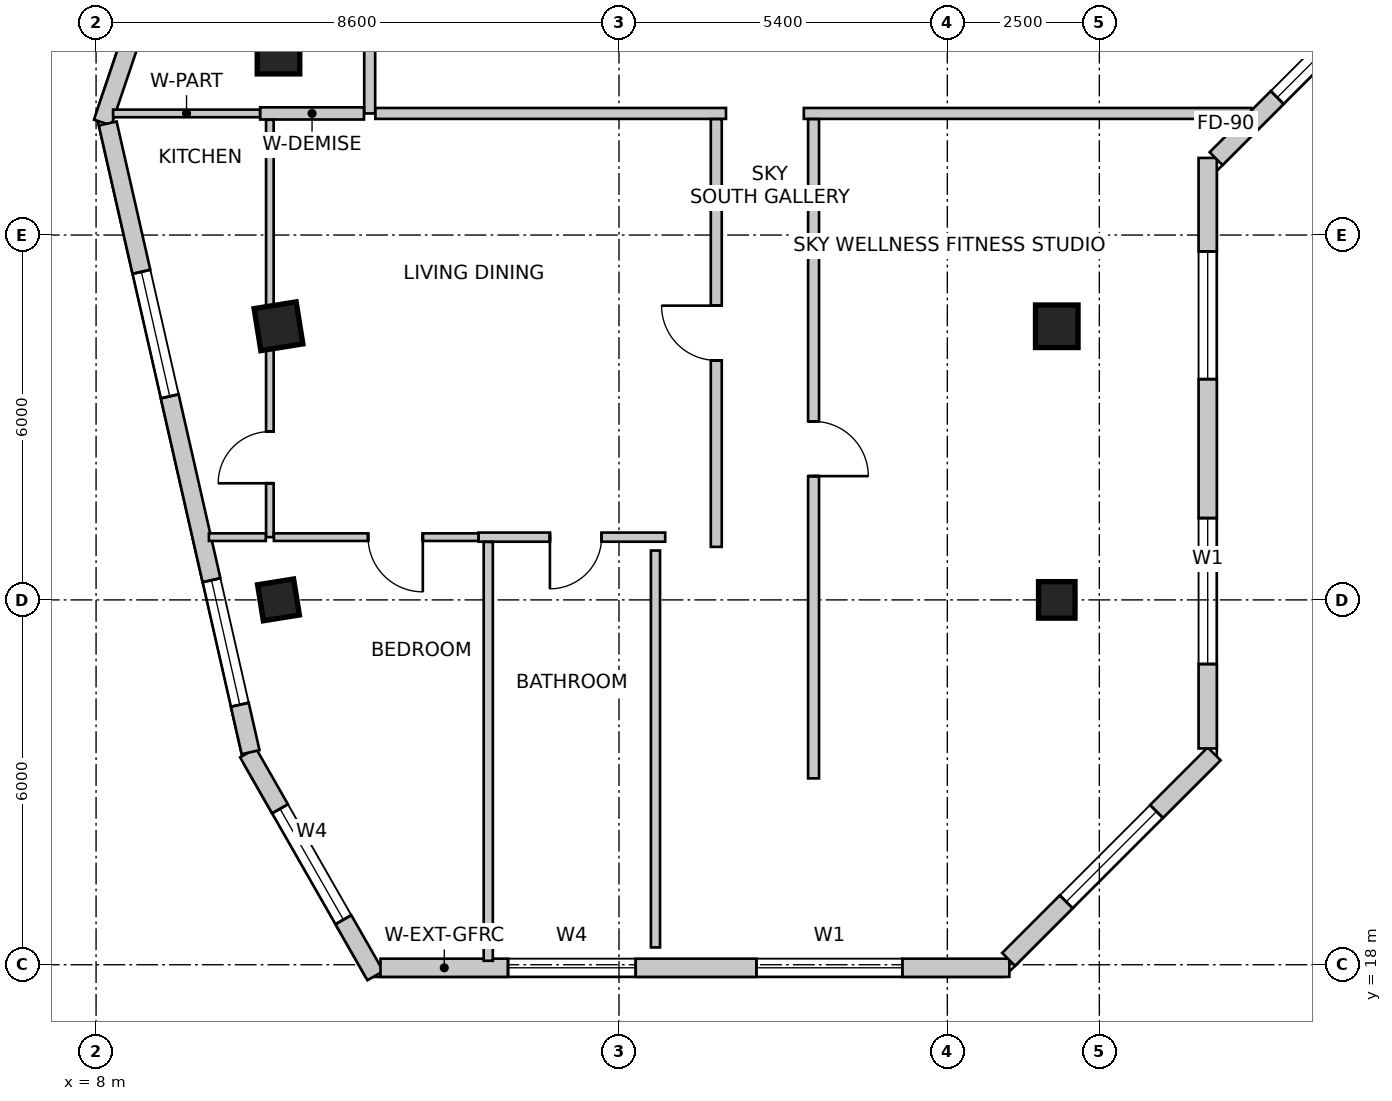
"""IFC4 building model, lengths in metres.
Left out: names, types, materials, properties, quantities, classifications, styles, units other than length and angle.
Written with IfcOpenShell. Run it as: python <this file> out.ifc"""

import sys

from ifc_helpers import new_model, si_unit, direction, frame, frame_2d, origin, origin_2d, place, context, subcontext, project, spatial, rectangle, extrude, source, transform, mapped, element, fill, save


model = new_model("IFC4")
c1 = context("Model", 3, precision=1e-05, world=origin(), true_north=direction((0.0, 1.0)))
c2 = subcontext(c1, "Body", "Model", "MODEL_VIEW")
j1 = project(units=[si_unit("LENGTHUNIT", "METRE"), si_unit("PLANEANGLEUNIT", "RADIAN")], contexts=[c1])
p1 = place(None, origin())
s1 = spatial("IfcSite", under=j1, at=p1, CompositionType="ELEMENT")
p2 = place(p1, origin())
s2 = spatial("IfcBuilding", under=s1, at=p2, CompositionType="ELEMENT")
p3 = place(p2, frame((0.0, 0.0, 267.3)))
s3 = spatial("IfcBuildingStorey", under=s2, at=p3, CompositionType="ELEMENT", Elevation=267.3)
m1 = source(origin(), c2, "Body", "SweptSolid", [
    extrude(rectangle(XDim=0.7, YDim=0.7, at=origin_2d()), origin(), (0.0, 0.0, 1.0), 3.6),
])
for number, where, z_axis, x_axis in (
    (1, (11.0, 33.0, 0.0), (0.0, 0.0, 1.0), (1.0, 0.0, 0.0)),
    (2, (11.0, 28.5, 0.0), (0.0, 0.0, 1.0), (0.158, -0.987, 0.0)),
):
    element("IfcColumn", number, at=place(p3, frame(where, z_axis=z_axis, x_axis=x_axis)), inside=s3, PredefinedType="COLUMN", context=c2, shape_type="MappedRepresentation", body=[
        mapped(m1, transform((0.0, 0.0, 0.0), scale=1.0)),
    ])
m2 = source(origin(), c2, "Body", "SweptSolid", [
    extrude(rectangle(XDim=0.6, YDim=0.6, at=origin_2d()), origin(), (0.0, 0.0, 1.0), 3.6),
])
p4 = place(p3, frame((11.0, 24.0, 0.0), z_axis=(0.0, 0.0, 1.0), x_axis=(0.158158067254, -0.987413806751, 0.0)))
e3 = element("IfcColumn", 3, at=p4, inside=s3, PredefinedType="COLUMN", context=c2, shape_type="MappedRepresentation", body=[
    mapped(m2, transform((0.0, 0.0, 0.0), scale=1.0)),
])
p5 = place(p3, frame((23.8, 28.5, 0.0), z_axis=(0.0, 0.0, 1.0), x_axis=(1.0, 0.0, 0.0)))
e4 = element("IfcColumn", 4, at=p5, inside=s3, PredefinedType="COLUMN", context=c2, shape_type="MappedRepresentation", body=[
    mapped(m1, transform((0.0, 0.0, 0.0), scale=1.0)),
])
p6 = place(p3, frame((23.8, 24.0, 0.0), z_axis=(0.0, 0.0, 1.0), x_axis=(1.0, 0.0, 0.0)))
e5 = element("IfcColumn", 5, at=p6, inside=s3, PredefinedType="COLUMN", context=c2, shape_type="MappedRepresentation", body=[
    mapped(m2, transform((0.0, 0.0, 0.0), scale=1.0)),
])
p7 = place(p3, frame((10.499, 21.485, 0.0), z_axis=(0.0, 0.0, 1.0), x_axis=(0.496163848656, -0.868228907194, 0.0)))
e6 = element("IfcWall", 6, at=p7, inside=s3, PredefinedType="SOLIDWALL", context=c2, shape_type="SweptSolid", body=[
    extrude(rectangle(XDim=4.222, YDim=0.3, at=frame_2d((2.111, 0.0))), origin(), (0.0, 0.0, 1.0), 3.35),
])
m3 = source(origin(), c2, "Body", "SweptSolid", [
    extrude(rectangle(XDim=2.1, YDim=2.0, at=frame_2d((1.05, 1.0))), frame((0.0, 0.16, 0.0), z_axis=(0.0, -1.0, 0.0), x_axis=(1.0, 0.0, 0.0)), (0.0, 0.0, 1.0), 0.32),
])
p8 = place(p7, frame((1.061, 0.0, 0.85)))
e7 = element("IfcOpeningElement", 7, at=p8, cuts=e6, PredefinedType="OPENING", context=c2, shape_type="MappedRepresentation", body=[
    mapped(m3, transform((0.0, 0.0, 0.0), scale=1.0)),
])
p9 = place(p3, frame((12.678, 17.95, 0.0), z_axis=(0.0, 0.0, 1.0), x_axis=(1.0, 0.0, 0.0)))
e8 = element("IfcWall", 8, at=p9, inside=s3, PredefinedType="SOLIDWALL", context=c2, shape_type="SweptSolid", body=[
    extrude(rectangle(XDim=10.342, YDim=0.3, at=frame_2d((5.171, 0.0))), origin(), (0.0, 0.0, 1.0), 3.35),
])
p10 = place(p9, frame((2.097, 0.0, 0.85)))
e9 = element("IfcOpeningElement", 9, at=p10, cuts=e8, PredefinedType="OPENING", context=c2, shape_type="MappedRepresentation", body=[
    mapped(m3, transform((0.0, 0.0, 0.0), scale=1.0)),
])
m4 = source(origin(), c2, "Body", "SweptSolid", [
    extrude(rectangle(XDim=2.4, YDim=2.2, at=frame_2d((1.2, 1.1))), frame((0.0, 0.16, 0.0), z_axis=(0.0, -1.0, 0.0), x_axis=(1.0, 0.0, 0.0)), (0.0, 0.0, 1.0), 0.32),
])
p11 = place(p9, frame((6.182, 0.0, 0.85)))
e10 = element("IfcOpeningElement", 10, at=p11, cuts=e8, PredefinedType="OPENING", context=c2, shape_type="MappedRepresentation", body=[
    mapped(m4, transform((0.0, 0.0, 0.0), scale=1.0)),
])
p12 = place(p3, frame((23.008, 18.088, 0.0), z_axis=(0.0, 0.0, 1.0), x_axis=(0.707106781187, 0.707106781187, 0.0)))
e11 = element("IfcWall", 11, at=p12, inside=s3, PredefinedType="SOLIDWALL", context=c2, shape_type="SweptSolid", body=[
    extrude(rectangle(XDim=4.781, YDim=0.3, at=frame_2d((2.39, 0.0))), origin(), (0.0, 0.0, 1.0), 3.35),
])
p13 = place(p12, frame((1.34, 0.0, 0.85)))
e12 = element("IfcOpeningElement", 12, at=p13, cuts=e11, PredefinedType="OPENING", context=c2, shape_type="MappedRepresentation", body=[
    mapped(m3, transform((0.0, 0.0, 0.0), scale=1.0)),
])
p14 = place(p3, frame((26.282, 21.557, 0.0), z_axis=(0.0, 0.0, 1.0), x_axis=(0.0, 1.0, 0.0)))
e13 = element("IfcWall", 13, at=p14, inside=s3, PredefinedType="SOLIDWALL", context=c2, shape_type="SweptSolid", body=[
    extrude(rectangle(XDim=9.711, YDim=0.3, at=frame_2d((4.855, 0.0))), origin(), (0.0, 0.0, 1.0), 3.35),
])
p15 = place(p14, frame((1.388, 0.0, 0.85)))
e14 = element("IfcOpeningElement", 14, at=p15, cuts=e13, PredefinedType="OPENING", context=c2, shape_type="MappedRepresentation", body=[
    mapped(m4, transform((0.0, 0.0, 0.0), scale=1.0)),
])
p16 = place(p14, frame((6.073, 0.0, 0.85)))
e15 = element("IfcOpeningElement", 15, at=p16, cuts=e13, PredefinedType="OPENING", context=c2, shape_type="MappedRepresentation", body=[
    mapped(m3, transform((0.0, 0.0, 0.0), scale=1.0)),
])
p17 = place(p3, frame((26.42, 31.256, 0.0), z_axis=(0.0, 0.0, 1.0), x_axis=(0.707106781187, 0.707106781187, 0.0)))
e16 = element("IfcWall", 16, at=p17, inside=s3, PredefinedType="SOLIDWALL", context=c2, shape_type="SweptSolid", body=[
    extrude(rectangle(XDim=2.907, YDim=0.3, at=frame_2d((1.454, 0.0))), origin(), (0.0, 0.0, 1.0), 3.35),
])
m5 = source(origin(), c2, "Body", "SweptSolid", [
    extrude(rectangle(XDim=0.9, YDim=1.6, at=frame_2d((0.45, 0.8))), frame((0.0, 0.16, 0.0), z_axis=(0.0, -1.0, 0.0), x_axis=(1.0, 0.0, 0.0)), (0.0, 0.0, 1.0), 0.32),
])
p18 = place(p17, frame((1.422, 0.0, 0.85)))
e17 = element("IfcOpeningElement", 17, at=p18, cuts=e16, PredefinedType="OPENING", context=c2, shape_type="MappedRepresentation", body=[
    mapped(m5, transform((0.0, 0.0, 0.0), scale=1.0)),
])
p19 = place(p3, frame((13.269, 47.134, 0.0), z_axis=(0.0, 0.0, 1.0), x_axis=(-0.3199211297, -0.947444178182, 0.0)))
e18 = element("IfcWall", 18, at=p19, inside=s3, PredefinedType="SOLIDWALL", context=c2, shape_type="SweptSolid", body=[
    extrude(rectangle(XDim=16.132, YDim=0.3, at=frame_2d((8.066, 0.0))), origin(), (0.0, 0.0, 1.0), 3.35),
])
p20 = place(p19, frame((2.435, 0.0, 0.85)))
e19 = element("IfcOpeningElement", 19, at=p20, cuts=e18, PredefinedType="OPENING", context=c2, shape_type="MappedRepresentation", body=[
    mapped(m4, transform((0.0, 0.0, 0.0), scale=1.0)),
])
p21 = place(p19, frame((7.417, 0.0, 0.85)))
e20 = element("IfcOpeningElement", 20, at=p21, cuts=e18, PredefinedType="OPENING", context=c2, shape_type="MappedRepresentation", body=[
    mapped(m3, transform((0.0, 0.0, 0.0), scale=1.0)),
])
p22 = place(p19, frame((12.099, 0.0, 0.85)))
e21 = element("IfcOpeningElement", 21, at=p22, cuts=e18, PredefinedType="OPENING", context=c2, shape_type="MappedRepresentation", body=[
    mapped(m4, transform((0.0, 0.0, 0.0), scale=1.0)),
])
p23 = place(p3, frame((8.191, 31.834, 0.0), z_axis=(0.0, 0.0, 1.0), x_axis=(0.221636032737, -0.975129462683, 0.0)))
e22 = element("IfcWall", 22, at=p23, inside=s3, PredefinedType="SOLIDWALL", context=c2, shape_type="SweptSolid", body=[
    extrude(rectangle(XDim=10.602, YDim=0.3, at=frame_2d((5.301, 0.0))), origin(), (0.0, 0.0, 1.0), 3.35),
])
p24 = place(p23, frame((2.501, 0.0, 0.85)))
e23 = element("IfcOpeningElement", 23, at=p24, cuts=e22, PredefinedType="OPENING", context=c2, shape_type="MappedRepresentation", body=[
    mapped(m3, transform((0.0, 0.0, 0.0), scale=1.0)),
])
p25 = place(p23, frame((7.702, 0.0, 0.85)))
e24 = element("IfcOpeningElement", 24, at=p25, cuts=e22, PredefinedType="OPENING", context=c2, shape_type="MappedRepresentation", body=[
    mapped(m3, transform((0.0, 0.0, 0.0), scale=1.0)),
])
p26 = place(p3, frame((12.5, 32.0, 0.0), z_axis=(0.0, 0.0, 1.0), x_axis=(0.0, 1.0, 0.0)))
e25 = element("IfcWall", 25, at=p26, inside=s3, PredefinedType="PARTITIONING", context=c2, shape_type="SweptSolid", body=[
    extrude(rectangle(XDim=1.556, YDim=0.18, at=frame_2d((0.778, 0.0))), origin(), (0.0, 0.0, 1.0), 3.034),
])
p27 = place(p3, frame((18.36, 32.0, 0.0), z_axis=(0.0, 0.0, 1.0), x_axis=(-1.0, 0.0, 0.0)))
e26 = element("IfcWall", 26, at=p27, inside=s3, PredefinedType="PARTITIONING", context=c2, shape_type="SweptSolid", body=[
    extrude(rectangle(XDim=5.766, YDim=0.18, at=frame_2d((2.883, 0.0))), origin(), (0.0, 0.0, 1.0), 3.034),
])
p28 = place(p3, frame((27.001, 32.0, 0.0), z_axis=(0.0, 0.0, 1.0), x_axis=(-1.0, 0.0, 0.0)))
e27 = element("IfcWall", 27, at=p28, inside=s3, PredefinedType="PARTITIONING", context=c2, shape_type="SweptSolid", body=[
    extrude(rectangle(XDim=7.361, YDim=0.18, at=frame_2d((3.681, 0.0))), origin(), (0.0, 0.0, 1.0), 3.034),
])
p29 = place(p3, frame((12.406, 32.0, 0.0), z_axis=(0.0, 0.0, 1.0), x_axis=(-1.0, 0.0, 0.0)))
e28 = element("IfcWall", 28, at=p29, inside=s3, PredefinedType="PARTITIONING", context=c2, shape_type="SweptSolid", body=[
    extrude(rectangle(XDim=1.708, YDim=0.2, at=frame_2d((0.854, 0.0))), origin(), (0.0, 0.0, 1.0), 2.642),
])
p30 = place(p3, frame((10.696, 32.0, 0.0), z_axis=(0.0, 0.0, 1.0), x_axis=(-1.0, 0.0, 0.0)))
e29 = element("IfcWall", 29, at=p30, inside=s3, PredefinedType="PARTITIONING", context=c2, shape_type="SweptSolid", body=[
    extrude(rectangle(XDim=2.416, YDim=0.125, at=frame_2d((1.208, 0.0))), origin(), (0.0, 0.0, 1.0), 3.35),
])
p31 = place(p3, frame((18.2, 24.872, 0.0), z_axis=(0.0, 0.0, 1.0), x_axis=(0.0, 1.0, 0.0)))
e30 = element("IfcWall", 30, at=p31, inside=s3, PredefinedType="PARTITIONING", context=c2, shape_type="SweptSolid", body=[
    extrude(rectangle(XDim=7.034, YDim=0.18, at=frame_2d((3.517, 0.0))), origin(), (0.0, 0.0, 1.0), 2.922),
])
m6 = source(origin(), c2, "Body", "SweptSolid", [
    extrude(rectangle(XDim=0.9, YDim=2.15, at=frame_2d((0.45, 1.075))), frame((0.0, 0.1, 0.0), z_axis=(0.0, -1.0, 0.0), x_axis=(1.0, 0.0, 0.0)), (0.0, 0.0, 1.0), 0.2),
])
p32 = place(p31, frame((3.067, 0.0, 0.0)))
e31 = element("IfcOpeningElement", 31, at=p32, cuts=e30, PredefinedType="OPENING", context=c2, shape_type="MappedRepresentation", body=[
    mapped(m6, transform((0.0, 0.0, 0.0), scale=1.0)),
])
p33 = place(p3, frame((19.8, 31.906, 0.0), z_axis=(0.0, 0.0, 1.0), x_axis=(0.0, -1.0, 0.0)))
e32 = element("IfcWall", 32, at=p33, inside=s3, PredefinedType="PARTITIONING", context=c2, shape_type="SweptSolid", body=[
    extrude(rectangle(XDim=10.841, YDim=0.18, at=frame_2d((5.42, 0.0))), origin(), (0.0, 0.0, 1.0), 2.922),
])
p34 = place(p33, frame((4.97, 0.0, 0.0)))
e33 = element("IfcOpeningElement", 33, at=p34, cuts=e32, PredefinedType="OPENING", context=c2, shape_type="MappedRepresentation", body=[
    mapped(m6, transform((0.0, 0.0, 0.0), scale=1.0)),
])
p35 = place(p3, frame((10.858, 25.032, 0.0), z_axis=(0.0, 0.0, 1.0), x_axis=(0.0, 1.0, 0.0)))
e34 = element("IfcWall", 34, at=p35, inside=s3, PredefinedType="PARTITIONING", context=c2, shape_type="SweptSolid", body=[
    extrude(rectangle(XDim=6.864, YDim=0.125, at=frame_2d((3.432, 0.0))), origin(), (0.0, 0.0, 1.0), 2.642),
])
m7 = source(origin(), c2, "Body", "SweptSolid", [
    extrude(rectangle(XDim=0.85, YDim=2.15, at=frame_2d((0.425, 1.075))), frame((0.0, 0.073, 0.0), z_axis=(0.0, -1.0, 0.0), x_axis=(1.0, 0.0, 0.0)), (0.0, 0.0, 1.0), 0.145),
])
p36 = place(p35, frame((0.886, 0.0, 0.0)))
e35 = element("IfcOpeningElement", 35, at=p36, cuts=e34, PredefinedType="OPENING", context=c2, shape_type="MappedRepresentation", body=[
    mapped(m7, transform((0.0, 0.0, 0.0), scale=1.0)),
])
p37 = place(p3, frame((17.36, 25.032, 0.0), z_axis=(0.0, 0.0, 1.0), x_axis=(-1.0, 0.0, 0.0)))
e36 = element("IfcWall", 36, at=p37, inside=s3, PredefinedType="PARTITIONING", context=c2, shape_type="SweptSolid", body=[
    extrude(rectangle(XDim=3.07, YDim=0.15, at=frame_2d((1.535, 0.0))), origin(), (0.0, 0.0, 1.0), 2.922),
])
m8 = source(origin(), c2, "Body", "SweptSolid", [
    extrude(rectangle(XDim=0.85, YDim=2.15, at=frame_2d((0.425, 1.075))), frame((0.0, 0.085, 0.0), z_axis=(0.0, -1.0, 0.0), x_axis=(1.0, 0.0, 0.0)), (0.0, 0.0, 1.0), 0.17),
])
p38 = place(p37, frame((1.046, 0.0, 0.0)))
e37 = element("IfcOpeningElement", 37, at=p38, cuts=e36, PredefinedType="OPENING", context=c2, shape_type="MappedRepresentation", body=[
    mapped(m8, transform((0.0, 0.0, 0.0), scale=1.0)),
])
p39 = place(p3, frame((14.288, 25.032, 0.0), z_axis=(0.0, 0.0, 1.0), x_axis=(-1.0, 0.0, 0.0)))
e38 = element("IfcWall", 38, at=p39, inside=s3, PredefinedType="PARTITIONING", context=c2, shape_type="SweptSolid", body=[
    extrude(rectangle(XDim=3.364, YDim=0.125, at=frame_2d((1.682, 0.0))), origin(), (0.0, 0.0, 1.0), 2.642),
])
m9 = source(origin(), c2, "Body", "SweptSolid", [
    extrude(rectangle(XDim=0.9, YDim=2.15, at=frame_2d((0.45, 1.075))), frame((0.0, 0.073, 0.0), z_axis=(0.0, -1.0, 0.0), x_axis=(1.0, 0.0, 0.0)), (0.0, 0.0, 1.0), 0.145),
])
p40 = place(p39, frame((0.915, 0.0, 0.0)))
e39 = element("IfcOpeningElement", 39, at=p40, cuts=e38, PredefinedType="OPENING", context=c2, shape_type="MappedRepresentation", body=[
    mapped(m9, transform((0.0, 0.0, 0.0), scale=1.0)),
])
p41 = place(p3, frame((10.792, 25.032, 0.0), z_axis=(0.0, 0.0, 1.0), x_axis=(-1.0, 0.0, 0.0)))
e40 = element("IfcWall", 40, at=p41, inside=s3, PredefinedType="PARTITIONING", context=c2, shape_type="SweptSolid", body=[
    extrude(rectangle(XDim=0.936, YDim=0.125, at=frame_2d((0.468, 0.0))), origin(), (0.0, 0.0, 1.0), 3.35),
])
p42 = place(p3, frame((14.45, 18.065, 0.0), z_axis=(0.0, 0.0, 1.0), x_axis=(0.0, 1.0, 0.0)))
e41 = element("IfcWall", 41, at=p42, inside=s3, PredefinedType="PARTITIONING", context=c2, shape_type="SweptSolid", body=[
    extrude(rectangle(XDim=6.888, YDim=0.15, at=frame_2d((3.444, 0.0))), origin(), (0.0, 0.0, 1.0), 2.979),
])
p43 = place(p3, frame((17.2, 24.812, 0.0), z_axis=(0.0, 0.0, 1.0), x_axis=(0.0, -1.0, 0.0)))
e42 = element("IfcWall", 42, at=p43, inside=s3, PredefinedType="PARTITIONING", context=c2, shape_type="SweptSolid", body=[
    extrude(rectangle(XDim=6.527, YDim=0.15, at=frame_2d((3.264, 0.0))), origin(), (0.0, 0.0, 1.0), 2.979),
])
m10 = source(origin(), c2, "Body", "SweptSolid", [
    extrude(rectangle(XDim=2.1, YDim=2.0, at=frame_2d((1.05, 1.0))), frame((0.0, -0.015, 0.0), z_axis=(0.0, -1.0, 0.0), x_axis=(1.0, 0.0, 0.0)), (0.0, 0.0, 1.0), 0.06),
])
p44 = place(p8, origin())
e43 = element("IfcWindow", 43, at=p44, inside=s3, PartitioningType="SINGLE_PANEL", PredefinedType="WINDOW", context=c2, shape_type="MappedRepresentation", body=[
    mapped(m10, transform((0.0, 0.0, 0.0), scale=1.0)),
])
fill(e7, e43)
p45 = place(p10, origin())
e44 = element("IfcWindow", 44, at=p45, inside=s3, PartitioningType="SINGLE_PANEL", PredefinedType="WINDOW", context=c2, shape_type="MappedRepresentation", body=[
    mapped(m10, transform((0.0, 0.0, 0.0), scale=1.0)),
])
fill(e9, e44)
m11 = source(origin(), c2, "Body", "SweptSolid", [
    extrude(rectangle(XDim=2.4, YDim=2.2, at=frame_2d((1.2, 1.1))), frame((0.0, -0.015, 0.0), z_axis=(0.0, -1.0, 0.0), x_axis=(1.0, 0.0, 0.0)), (0.0, 0.0, 1.0), 0.06),
])
p46 = place(p11, origin())
e45 = element("IfcWindow", 45, at=p46, inside=s3, PartitioningType="SINGLE_PANEL", PredefinedType="WINDOW", context=c2, shape_type="MappedRepresentation", body=[
    mapped(m11, transform((0.0, 0.0, 0.0), scale=1.0)),
])
fill(e10, e45)
p47 = place(p13, origin())
e46 = element("IfcWindow", 46, at=p47, inside=s3, PartitioningType="SINGLE_PANEL", PredefinedType="WINDOW", context=c2, shape_type="MappedRepresentation", body=[
    mapped(m10, transform((0.0, 0.0, 0.0), scale=1.0)),
])
fill(e12, e46)
p48 = place(p15, origin())
e47 = element("IfcWindow", 47, at=p48, inside=s3, PartitioningType="SINGLE_PANEL", PredefinedType="WINDOW", context=c2, shape_type="MappedRepresentation", body=[
    mapped(m11, transform((0.0, 0.0, 0.0), scale=1.0)),
])
fill(e14, e47)
p49 = place(p16, origin())
e48 = element("IfcWindow", 48, at=p49, inside=s3, PartitioningType="SINGLE_PANEL", PredefinedType="WINDOW", context=c2, shape_type="MappedRepresentation", body=[
    mapped(m10, transform((0.0, 0.0, 0.0), scale=1.0)),
])
fill(e15, e48)
m12 = source(origin(), c2, "Body", "SweptSolid", [
    extrude(rectangle(XDim=0.9, YDim=1.6, at=frame_2d((0.45, 0.8))), frame((0.0, -0.015, 0.0), z_axis=(0.0, -1.0, 0.0), x_axis=(1.0, 0.0, 0.0)), (0.0, 0.0, 1.0), 0.06),
])
p50 = place(p18, origin())
e49 = element("IfcWindow", 49, at=p50, inside=s3, PartitioningType="SINGLE_PANEL", PredefinedType="WINDOW", context=c2, shape_type="MappedRepresentation", body=[
    mapped(m12, transform((0.0, 0.0, 0.0), scale=1.0)),
])
fill(e17, e49)
p51 = place(p24, origin())
e50 = element("IfcWindow", 50, at=p51, inside=s3, PartitioningType="SINGLE_PANEL", PredefinedType="WINDOW", context=c2, shape_type="MappedRepresentation", body=[
    mapped(m10, transform((0.0, 0.0, 0.0), scale=1.0)),
])
fill(e23, e50)
p52 = place(p25, origin())
e51 = element("IfcWindow", 51, at=p52, inside=s3, PartitioningType="SINGLE_PANEL", PredefinedType="WINDOW", context=c2, shape_type="MappedRepresentation", body=[
    mapped(m10, transform((0.0, 0.0, 0.0), scale=1.0)),
])
fill(e24, e51)
m13 = source(origin(), c2, "Body", "SweptSolid", [
    extrude(rectangle(XDim=0.9, YDim=2.15, at=frame_2d((0.45, 1.075))), frame((0.0, 0.025, 0.0), z_axis=(0.0, -1.0, 0.0), x_axis=(1.0, 0.0, 0.0)), (0.0, 0.0, 1.0), 0.05),
])
p53 = place(p32, origin())
e52 = element("IfcDoor", 52, at=p53, inside=s3, OperationType="SINGLE_SWING_RIGHT", PredefinedType="DOOR", context=c2, shape_type="MappedRepresentation", body=[
    mapped(m13, transform((0.0, 0.0, 0.0), scale=1.0)),
])
fill(e31, e52)
m14 = source(origin(), c2, "Body", "SweptSolid", [
    extrude(rectangle(XDim=0.85, YDim=2.15, at=frame_2d((0.425, 1.075))), frame((0.0, 0.025, 0.0), z_axis=(0.0, -1.0, 0.0), x_axis=(1.0, 0.0, 0.0)), (0.0, 0.0, 1.0), 0.05),
])
p54 = place(p36, origin())
e53 = element("IfcDoor", 53, at=p54, inside=s3, OperationType="SINGLE_SWING_LEFT", PredefinedType="DOOR", context=c2, shape_type="MappedRepresentation", body=[
    mapped(m14, transform((0.0, 0.0, 0.0), scale=1.0)),
])
fill(e35, e53)
p55 = place(p38, origin())
e54 = element("IfcDoor", 54, at=p55, inside=s3, OperationType="SINGLE_SWING_RIGHT", PredefinedType="DOOR", context=c2, shape_type="MappedRepresentation", body=[
    mapped(m14, transform((0.0, 0.0, 0.0), scale=1.0)),
])
fill(e37, e54)
m15 = source(origin(), c2, "Body", "SweptSolid", [
    extrude(rectangle(XDim=0.9, YDim=2.15, at=frame_2d((0.45, 1.075))), frame((0.0, 0.025, 0.0), z_axis=(0.0, -1.0, 0.0), x_axis=(1.0, 0.0, 0.0)), (0.0, 0.0, 1.0), 0.05),
])
p56 = place(p40, origin())
e55 = element("IfcDoor", 55, at=p56, inside=s3, OperationType="SINGLE_SWING_LEFT", PredefinedType="DOOR", context=c2, shape_type="MappedRepresentation", body=[
    mapped(m15, transform((0.0, 0.0, 0.0), scale=1.0)),
])
fill(e39, e55)
p57 = place(p34, origin())
e56 = element("IfcDoor", 56, at=p57, inside=s3, OperationType="SINGLE_SWING_RIGHT", PredefinedType="DOOR", context=c2, shape_type="MappedRepresentation", body=[
    mapped(m15, transform((0.0, 0.0, 0.0), scale=1.0)),
])
fill(e33, e56)
save(model, sys.argv[1])
